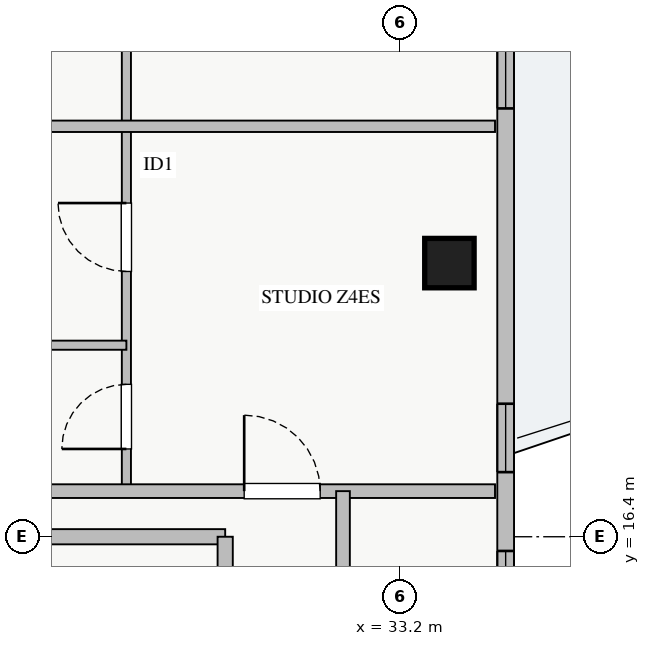
"""IFC4 building model, lengths in metres.
Left out: names, types, materials, properties, quantities, classifications, styles, units other than length and angle.
Written with IfcOpenShell. Run it as: python <this file> out.ifc"""

import sys

from ifc_helpers import new_model, si_unit, direction, frame, frame_2d, origin, origin_2d, place, context, subcontext, project, spatial, rectangle, extrude, source, transform, mapped, element, fill, save


model = new_model("IFC4")
c1 = context("Model", 3, precision=1e-05, world=origin(), true_north=direction((0.0, 1.0)))
c2 = subcontext(c1, "Body", "Model", "MODEL_VIEW")
j1 = project(units=[si_unit("LENGTHUNIT", "METRE"), si_unit("PLANEANGLEUNIT", "RADIAN")], contexts=[c1])
p1 = place(None, origin())
s1 = spatial("IfcSite", under=j1, at=p1, CompositionType="ELEMENT")
p2 = place(p1, origin())
s2 = spatial("IfcBuilding", under=s1, at=p2, CompositionType="ELEMENT")
p3 = place(p2, frame((0.0, 0.0, 253.5)))
s3 = spatial("IfcBuildingStorey", under=s2, at=p3, CompositionType="ELEMENT", Elevation=253.5)
m1 = source(origin(), c2, "Body", "SweptSolid", [
    extrude(rectangle(XDim=0.65, YDim=0.65, at=origin_2d()), origin(), (0.0, 0.0, 1.0), 3.25),
])
p4 = place(p3, frame((33.85, 20.0, 0.0), z_axis=(0.0, 0.0, 1.0), x_axis=(1.0, 0.0, 0.0)))
e1 = element("IfcColumn", 1, at=p4, inside=s3, PredefinedType="COLUMN", context=c2, shape_type="MappedRepresentation", body=[
    mapped(m1, transform((0.0, 0.0, 0.0), x_axis=(1.0, 0.0, 0.0), y_axis=(0.0, 1.0, 0.0), z_axis=(0.0, 0.0, 1.0), scale=1.0)),
])
p5 = place(p3, frame((34.59, 12.35, 0.0), z_axis=(0.0, 0.0, 1.0), x_axis=(0.0, 1.0, 0.0)))
e2 = element("IfcWall", 2, at=p5, inside=s3, PredefinedType="STANDARD", context=c2, shape_type="SweptSolid", body=[
    extrude(rectangle(XDim=21.3, YDim=0.22, at=frame_2d((10.65, 0.0))), origin(), (0.0, 0.0, 1.0), 2.61),
])
p6 = place(p5, frame((11.5, 0.0, 0.0)))
e3 = element("IfcOpeningElement", 3, at=p6, cuts=e2, PredefinedType="OPENING", context=c2, shape_type="SweptSolid", body=[
    extrude(rectangle(XDim=1.2, YDim=2.1, at=frame_2d((0.6, 1.05))), frame((0.0, 0.12, 0.0), z_axis=(0.0, -1.0, 0.0), x_axis=(1.0, 0.0, 0.0)), (0.0, 0.0, 1.0), 0.24),
])
p7 = place(p5, frame((1.463, 0.0, 0.9)))
e4 = element("IfcOpeningElement", 4, at=p7, cuts=e2, PredefinedType="OPENING", context=c2, shape_type="SweptSolid", body=[
    extrude(rectangle(XDim=2.4, YDim=1.48, at=frame_2d((1.2, 0.74))), frame((0.0, 0.12, 0.0), z_axis=(0.0, -1.0, 0.0), x_axis=(1.0, 0.0, 0.0)), (0.0, 0.0, 1.0), 0.24),
])
p8 = place(p5, frame((17.588, 0.0, 0.9)))
e5 = element("IfcOpeningElement", 5, at=p8, cuts=e2, PredefinedType="OPENING", context=c2, shape_type="SweptSolid", body=[
    extrude(rectangle(XDim=2.1, YDim=1.48, at=frame_2d((1.05, 0.74))), frame((0.0, 0.12, 0.0), z_axis=(0.0, -1.0, 0.0), x_axis=(1.0, 0.0, 0.0)), (0.0, 0.0, 1.0), 0.24),
])
p9 = place(p5, frame((4.9, 0.0, 0.9)))
e6 = element("IfcOpeningElement", 6, at=p9, cuts=e2, PredefinedType="OPENING", context=c2, shape_type="SweptSolid", body=[
    extrude(rectangle(XDim=0.9, YDim=1.2, at=frame_2d((0.45, 0.6))), frame((0.0, 0.12, 0.0), z_axis=(0.0, -1.0, 0.0), x_axis=(1.0, 0.0, 0.0)), (0.0, 0.0, 1.0), 0.24),
])
p10 = place(p5, frame((9.685, 0.0, 0.9)))
e7 = element("IfcOpeningElement", 7, at=p10, cuts=e2, PredefinedType="OPENING", context=c2, shape_type="SweptSolid", body=[
    extrude(rectangle(XDim=0.9, YDim=1.2, at=frame_2d((0.45, 0.6))), frame((0.0, 0.12, 0.0), z_axis=(0.0, -1.0, 0.0), x_axis=(1.0, 0.0, 0.0)), (0.0, 0.0, 1.0), 0.24),
])
p11 = place(p3, frame((27.8, 16.4, 0.0), z_axis=(0.0, 0.0, 1.0), x_axis=(1.0, 0.0, 0.0)))
e8 = element("IfcWall", 8, at=p11, inside=s3, PredefinedType="PARTITIONING", context=c2, shape_type="SweptSolid", body=[
    extrude(rectangle(XDim=3.1, YDim=0.2, at=frame_2d((1.55, 0.0))), origin(), (0.0, 0.0, 1.0), 3.07),
])
p12 = place(p3, frame((30.9, 12.5, 0.0), z_axis=(0.0, 0.0, 1.0), x_axis=(0.0, 1.0, 0.0)))
e9 = element("IfcWall", 9, at=p12, inside=s3, PredefinedType="PARTITIONING", context=c2, shape_type="SweptSolid", body=[
    extrude(rectangle(XDim=3.9, YDim=0.2, at=frame_2d((1.95, 0.0))), origin(), (0.0, 0.0, 1.0), 2.771),
])
p13 = place(p12, frame((1.4, 0.0, 0.0)))
e10 = element("IfcOpeningElement", 10, at=p13, cuts=e9, PredefinedType="OPENING", context=c2, shape_type="SweptSolid", body=[
    extrude(rectangle(XDim=1.1, YDim=2.05, at=frame_2d((0.55, 1.025))), frame((0.0, 0.11, 0.0), z_axis=(0.0, -1.0, 0.0), x_axis=(1.0, 0.0, 0.0)), (0.0, 0.0, 1.0), 0.22),
])
p14 = place(p3, frame((29.6, 17.0, 0.0), z_axis=(0.0, 0.0, 1.0), x_axis=(0.0, 1.0, 0.0)))
e11 = element("IfcWall", 11, at=p14, inside=s3, PredefinedType="PLUMBINGWALL", context=c2, shape_type="SweptSolid", body=[
    extrude(rectangle(XDim=4.8, YDim=0.12, at=frame_2d((2.4, 0.0))), origin(), (0.0, 0.0, 1.0), 3.07),
])
p15 = place(p14, frame((0.555, 0.0, 0.0)))
e12 = element("IfcOpeningElement", 12, at=p15, cuts=e11, PredefinedType="OPENING", context=c2, shape_type="SweptSolid", body=[
    extrude(rectangle(XDim=0.85, YDim=2.05, at=frame_2d((0.425, 1.025))), frame((0.0, 0.07, 0.0), z_axis=(0.0, -1.0, 0.0), x_axis=(1.0, 0.0, 0.0)), (0.0, 0.0, 1.0), 0.14),
])
p16 = place(p14, frame((2.89, 0.0, 0.0)))
e13 = element("IfcOpeningElement", 13, at=p16, cuts=e11, PredefinedType="OPENING", context=c2, shape_type="SweptSolid", body=[
    extrude(rectangle(XDim=0.9, YDim=2.05, at=frame_2d((0.45, 1.025))), frame((0.0, 0.07, 0.0), z_axis=(0.0, -1.0, 0.0), x_axis=(1.0, 0.0, 0.0)), (0.0, 0.0, 1.0), 0.14),
])
p17 = place(p3, frame((25.22, 18.92, 0.0), z_axis=(0.0, 0.0, 1.0), x_axis=(1.0, 0.0, 0.0)))
e14 = element("IfcWall", 14, at=p17, inside=s3, PredefinedType="PLUMBINGWALL", context=c2, shape_type="SweptSolid", body=[
    extrude(rectangle(XDim=4.38, YDim=0.12, at=frame_2d((2.19, 0.0))), origin(), (0.0, 0.0, 1.0), 3.07),
])
p18 = place(p3, frame((29.6, 21.8, 0.0), z_axis=(0.0, 0.0, 1.0), x_axis=(0.0, 1.0, 0.0)))
e15 = element("IfcWall", 15, at=p18, inside=s3, PredefinedType="PLUMBINGWALL", context=c2, shape_type="SweptSolid", body=[
    extrude(rectangle(XDim=7.2, YDim=0.12, at=frame_2d((3.6, 0.0))), origin(), (0.0, 0.0, 1.0), 3.07),
])
p19 = place(p18, frame((1.035, 0.0, 0.0)))
e16 = element("IfcOpeningElement", 16, at=p19, cuts=e15, PredefinedType="OPENING", context=c2, shape_type="SweptSolid", body=[
    extrude(rectangle(XDim=0.85, YDim=2.05, at=frame_2d((0.425, 1.025))), frame((0.0, 0.07, 0.0), z_axis=(0.0, -1.0, 0.0), x_axis=(1.0, 0.0, 0.0)), (0.0, 0.0, 1.0), 0.14),
])
p20 = place(p18, frame((4.57, 0.0, 0.0)))
e17 = element("IfcOpeningElement", 17, at=p20, cuts=e15, PredefinedType="OPENING", context=c2, shape_type="SweptSolid", body=[
    extrude(rectangle(XDim=0.9, YDim=2.05, at=frame_2d((0.45, 1.025))), frame((0.0, 0.07, 0.0), z_axis=(0.0, -1.0, 0.0), x_axis=(1.0, 0.0, 0.0)), (0.0, 0.0, 1.0), 0.14),
])
p21 = place(p3, frame((25.22, 21.8, 0.0), z_axis=(0.0, 0.0, 1.0), x_axis=(1.0, 0.0, 0.0)))
e18 = element("IfcWall", 18, at=p21, inside=s3, PredefinedType="PARTITIONING", context=c2, shape_type="SweptSolid", body=[
    extrude(rectangle(XDim=9.23, YDim=0.15, at=frame_2d((4.615, 0.0))), origin(), (0.0, 0.0, 1.0), 3.07),
])
p22 = place(p3, frame((27.8, 17.0, 0.0), z_axis=(0.0, 0.0, 1.0), x_axis=(1.0, 0.0, 0.0)))
e19 = element("IfcWall", 19, at=p22, inside=s3, PredefinedType="PARTITIONING", context=c2, shape_type="SweptSolid", body=[
    extrude(rectangle(XDim=6.65, YDim=0.18, at=frame_2d((3.325, 0.0))), origin(), (0.0, 0.0, 1.0), 3.07),
])
p23 = place(p22, frame((3.35, 0.0, 0.0)))
e20 = element("IfcOpeningElement", 20, at=p23, cuts=e19, PredefinedType="OPENING", context=c2, shape_type="SweptSolid", body=[
    extrude(rectangle(XDim=1.0, YDim=2.05, at=frame_2d((0.5, 1.025))), frame((0.0, 0.1, 0.0), z_axis=(0.0, -1.0, 0.0), x_axis=(1.0, 0.0, 0.0)), (0.0, 0.0, 1.0), 0.2),
])
p24 = place(p3, frame((32.45, 11.82, 0.0), z_axis=(0.0, 0.0, 1.0), x_axis=(0.0, 1.0, 0.0)))
e21 = element("IfcWall", 21, at=p24, inside=s3, PredefinedType="PARTITIONING", context=c2, shape_type="SweptSolid", body=[
    extrude(rectangle(XDim=5.18, YDim=0.18, at=frame_2d((2.59, 0.0))), origin(), (0.0, 0.0, 1.0), 3.07),
])
p25 = place(p24, frame((1.25, 0.0, 0.0)))
e22 = element("IfcOpeningElement", 22, at=p25, cuts=e21, PredefinedType="OPENING", context=c2, shape_type="SweptSolid", body=[
    extrude(rectangle(XDim=0.9, YDim=2.05, at=frame_2d((0.45, 1.025))), frame((0.0, 0.1, 0.0), z_axis=(0.0, -1.0, 0.0), x_axis=(1.0, 0.0, 0.0)), (0.0, 0.0, 1.0), 0.2),
])
m2 = source(origin(), c2, "Body", "SweptSolid", [
    extrude(rectangle(XDim=2.4, YDim=1.48, at=frame_2d((1.2, 0.74))), frame((0.0, 0.03, 0.0), z_axis=(0.0, -1.0, 0.0), x_axis=(1.0, 0.0, 0.0)), (0.0, 0.0, 1.0), 0.06),
])
p26 = place(p7, origin())
e23 = element("IfcWindow", 23, at=p26, inside=s3, PartitioningType="TRIPLE_PANEL_VERTICAL", PredefinedType="WINDOW", context=c2, shape_type="MappedRepresentation", body=[
    mapped(m2, transform((0.0, 0.0, 0.0), x_axis=(1.0, 0.0, 0.0), y_axis=(0.0, 1.0, 0.0), z_axis=(0.0, 0.0, 1.0), scale=1.0)),
])
fill(e4, e23)
m3 = source(origin(), c2, "Body", "SweptSolid", [
    extrude(rectangle(XDim=0.85, YDim=2.05, at=frame_2d((0.425, 1.025))), frame((0.0, 0.025, 0.0), z_axis=(0.0, -1.0, 0.0), x_axis=(1.0, 0.0, 0.0)), (0.0, 0.0, 1.0), 0.05),
])
p27 = place(p15, origin())
e24 = element("IfcDoor", 24, at=p27, inside=s3, OperationType="SINGLE_SWING_LEFT", PredefinedType="DOOR", context=c2, shape_type="MappedRepresentation", body=[
    mapped(m3, transform((0.0, 0.0, 0.0), x_axis=(1.0, 0.0, 0.0), y_axis=(0.0, 1.0, 0.0), z_axis=(0.0, 0.0, 1.0), scale=1.0)),
])
fill(e12, e24)
m4 = source(origin(), c2, "Body", "SweptSolid", [
    extrude(rectangle(XDim=0.9, YDim=2.05, at=frame_2d((0.45, 1.025))), frame((0.0, 0.025, 0.0), z_axis=(0.0, -1.0, 0.0), x_axis=(1.0, 0.0, 0.0)), (0.0, 0.0, 1.0), 0.05),
])
p28 = place(p16, origin())
e25 = element("IfcDoor", 25, at=p28, inside=s3, OperationType="SINGLE_SWING_RIGHT", PredefinedType="DOOR", context=c2, shape_type="MappedRepresentation", body=[
    mapped(m4, transform((0.0, 0.0, 0.0), x_axis=(1.0, 0.0, 0.0), y_axis=(0.0, 1.0, 0.0), z_axis=(0.0, 0.0, 1.0), scale=1.0)),
])
fill(e13, e25)
m5 = source(origin(), c2, "Body", "SweptSolid", [
    extrude(rectangle(XDim=1.0, YDim=2.05, at=frame_2d((0.5, 1.025))), frame((0.0, 0.025, 0.0), z_axis=(0.0, -1.0, 0.0), x_axis=(1.0, 0.0, 0.0)), (0.0, 0.0, 1.0), 0.05),
])
p29 = place(p23, origin())
e26 = element("IfcDoor", 26, at=p29, inside=s3, OperationType="SINGLE_SWING_LEFT", PredefinedType="DOOR", context=c2, shape_type="MappedRepresentation", body=[
    mapped(m5, transform((0.0, 0.0, 0.0), x_axis=(1.0, 0.0, 0.0), y_axis=(0.0, 1.0, 0.0), z_axis=(0.0, 0.0, 1.0), scale=1.0)),
])
fill(e20, e26)
m6 = source(origin(), c2, "Body", "SweptSolid", [
    extrude(rectangle(XDim=0.9, YDim=1.2, at=frame_2d((0.45, 0.6))), frame((0.0, 0.03, 0.0), z_axis=(0.0, -1.0, 0.0), x_axis=(1.0, 0.0, 0.0)), (0.0, 0.0, 1.0), 0.06),
])
p30 = place(p9, origin())
e27 = element("IfcWindow", 27, at=p30, inside=s3, PartitioningType="SINGLE_PANEL", PredefinedType="WINDOW", context=c2, shape_type="MappedRepresentation", body=[
    mapped(m6, transform((0.0, 0.0, 0.0), x_axis=(1.0, 0.0, 0.0), y_axis=(0.0, 1.0, 0.0), z_axis=(0.0, 0.0, 1.0), scale=1.0)),
])
fill(e6, e27)
p31 = place(p10, origin())
e28 = element("IfcWindow", 28, at=p31, inside=s3, PartitioningType="SINGLE_PANEL", PredefinedType="WINDOW", context=c2, shape_type="MappedRepresentation", body=[
    mapped(m6, transform((0.0, 0.0, 0.0), x_axis=(1.0, 0.0, 0.0), y_axis=(0.0, 1.0, 0.0), z_axis=(0.0, 0.0, 1.0), scale=1.0)),
])
fill(e7, e28)
save(model, sys.argv[1])
